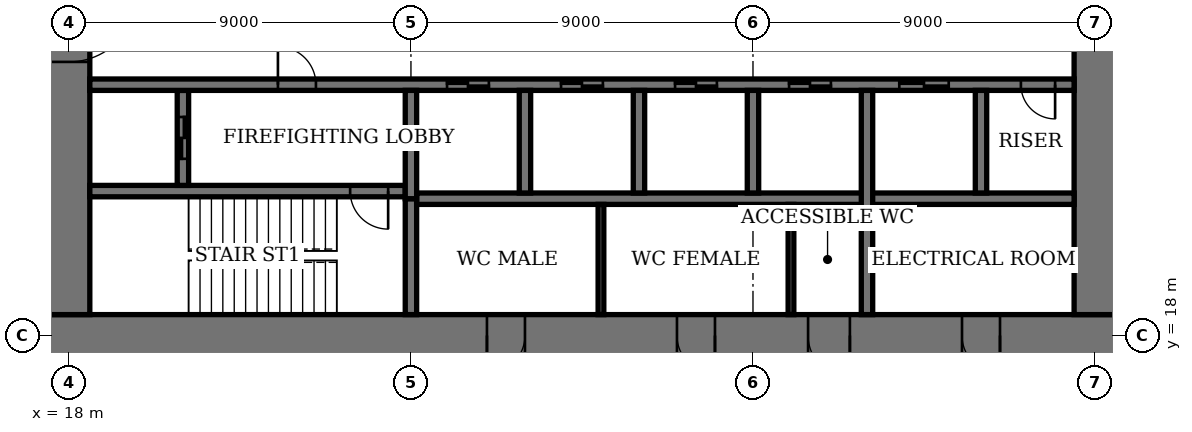
"""IFC4 building model, lengths in metres.
Left out: names, types, materials, properties, quantities, classifications, styles, units other than length and angle.
Written with IfcOpenShell. Run it as: python <this file> out.ifc"""

import sys

from ifc_helpers import new_model, si_unit, direction, frame, frame_2d, origin, place, context, subcontext, project, spatial, rectangle, extrude, element, fill, save


model = new_model("IFC4")
c1 = context("Model", 3, precision=1e-05, world=origin(), true_north=direction((0.0, 1.0)))
c2 = subcontext(c1, "Body", "Model", "MODEL_VIEW")
j1 = project(units=[si_unit("LENGTHUNIT", "METRE"), si_unit("PLANEANGLEUNIT", "RADIAN")], contexts=[c1])
p1 = place(None, origin())
s1 = spatial("IfcSite", under=j1, at=p1, CompositionType="ELEMENT")
p2 = place(p1, origin())
s2 = spatial("IfcBuilding", under=s1, at=p2, CompositionType="ELEMENT")
p3 = place(p2, frame((0.0, 0.0, 279.4)))
s3 = spatial("IfcBuildingStorey", under=s2, at=p3, CompositionType="ELEMENT", Elevation=279.4)
p4 = place(p3, frame((17.45, 18.0, 0.0), z_axis=(0.0, 0.0, 1.0), x_axis=(1.0, 0.0, 0.0)))
e1 = element("IfcWall", 1, at=p4, inside=s3, PredefinedType="SHEAR", context=c2, shape_type="SweptSolid", body=[
    extrude(rectangle(XDim=28.1, YDim=1.1, at=frame_2d((14.05, 0.0))), origin(), (0.0, 0.0, 1.0), 4.0),
])
p5 = place(p4, frame((11.55, 0.0, 0.0)))
e2 = element("IfcOpeningElement", 2, at=p5, cuts=e1, PredefinedType="OPENING", context=c2, shape_type="SweptSolid", body=[
    extrude(rectangle(XDim=1.0, YDim=2.4, at=frame_2d((0.5, 1.2))), frame((0.0, 0.56, 0.0), z_axis=(0.0, -1.0, 0.0), x_axis=(1.0, 0.0, 0.0)), (0.0, 0.0, 1.0), 1.12),
])
p6 = place(p4, frame((16.55, 0.0, 0.0)))
e3 = element("IfcOpeningElement", 3, at=p6, cuts=e1, PredefinedType="OPENING", context=c2, shape_type="SweptSolid", body=[
    extrude(rectangle(XDim=1.0, YDim=2.4, at=frame_2d((0.5, 1.2))), frame((0.0, 0.56, 0.0), z_axis=(0.0, -1.0, 0.0), x_axis=(1.0, 0.0, 0.0)), (0.0, 0.0, 1.0), 1.12),
])
p7 = place(p4, frame((20.0, 0.0, 0.0)))
e4 = element("IfcOpeningElement", 4, at=p7, cuts=e1, PredefinedType="OPENING", context=c2, shape_type="SweptSolid", body=[
    extrude(rectangle(XDim=1.1, YDim=2.4, at=frame_2d((0.55, 1.2))), frame((0.0, 0.56, 0.0), z_axis=(0.0, -1.0, 0.0), x_axis=(1.0, 0.0, 0.0)), (0.0, 0.0, 1.0), 1.12),
])
p8 = place(p4, frame((24.05, 0.0, 0.0)))
e5 = element("IfcOpeningElement", 5, at=p8, cuts=e1, PredefinedType="OPENING", context=c2, shape_type="SweptSolid", body=[
    extrude(rectangle(XDim=1.0, YDim=2.4, at=frame_2d((0.5, 1.2))), frame((0.0, 0.56, 0.0), z_axis=(0.0, -1.0, 0.0), x_axis=(1.0, 0.0, 0.0)), (0.0, 0.0, 1.0), 1.12),
])
p9 = place(p3, frame((18.0, 35.45, 0.0), z_axis=(0.0, 0.0, 1.0), x_axis=(0.0, -1.0, 0.0)))
e6 = element("IfcWall", 6, at=p9, inside=s3, PredefinedType="SHEAR", context=c2, shape_type="SweptSolid", body=[
    extrude(rectangle(XDim=16.9, YDim=1.1, at=frame_2d((8.45, 0.0))), origin(), (0.0, 0.0, 1.0), 4.0),
])
p10 = place(p9, frame((8.45, 0.0, 0.0)))
e7 = element("IfcOpeningElement", 7, at=p10, cuts=e6, PredefinedType="OPENING", context=c2, shape_type="SweptSolid", body=[
    extrude(rectangle(XDim=1.8, YDim=2.4, at=frame_2d((0.9, 1.2))), frame((0.0, 0.56, 0.0), z_axis=(0.0, -1.0, 0.0), x_axis=(1.0, 0.0, 0.0)), (0.0, 0.0, 1.0), 1.12),
])
p11 = place(p3, frame((45.0, 18.55, 0.0), z_axis=(0.0, 0.0, 1.0), x_axis=(0.0, 1.0, 0.0)))
e8 = element("IfcWall", 8, at=p11, inside=s3, PredefinedType="SHEAR", context=c2, shape_type="SweptSolid", body=[
    extrude(rectangle(XDim=16.9, YDim=1.1, at=frame_2d((8.45, 0.0))), origin(), (0.0, 0.0, 1.0), 4.0),
])
p12 = place(p11, frame((8.45, 0.0, 0.0)))
e9 = element("IfcOpeningElement", 9, at=p12, cuts=e8, PredefinedType="OPENING", context=c2, shape_type="SweptSolid", body=[
    extrude(rectangle(XDim=1.8, YDim=2.4, at=frame_2d((0.9, 1.2))), frame((0.0, 0.56, 0.0), z_axis=(0.0, -1.0, 0.0), x_axis=(1.0, 0.0, 0.0)), (0.0, 0.0, 1.0), 1.12),
])
p13 = place(p3, frame((18.55, 21.8, 0.0), z_axis=(0.0, 0.0, 1.0), x_axis=(1.0, 0.0, 0.0)))
e10 = element("IfcWall", 10, at=p13, inside=s3, PredefinedType="SHEAR", context=c2, shape_type="SweptSolid", body=[
    extrude(rectangle(XDim=8.3, YDim=0.3, at=frame_2d((4.15, 0.0))), origin(), (0.0, 0.0, 1.0), 4.0),
])
p14 = place(p13, frame((6.85, 0.0, 0.0)))
e11 = element("IfcOpeningElement", 11, at=p14, cuts=e10, PredefinedType="OPENING", context=c2, shape_type="SweptSolid", body=[
    extrude(rectangle(XDim=1.0, YDim=2.4, at=frame_2d((0.5, 1.2))), frame((0.0, 0.16, 0.0), z_axis=(0.0, -1.0, 0.0), x_axis=(1.0, 0.0, 0.0)), (0.0, 0.0, 1.0), 0.32),
])
p15 = place(p3, frame((27.0, 18.55, 0.0), z_axis=(0.0, 0.0, 1.0), x_axis=(0.0, 1.0, 0.0)))
e12 = element("IfcWall", 12, at=p15, inside=s3, PredefinedType="SHEAR", context=c2, shape_type="SweptSolid", body=[
    extrude(rectangle(XDim=3.05, YDim=0.3, at=frame_2d((1.525, 0.0))), origin(), (0.0, 0.0, 1.0), 4.0),
])
p16 = place(p3, frame((21.0, 21.95, 0.0), z_axis=(0.0, 0.0, 1.0), x_axis=(0.0, 1.0, 0.0)))
e13 = element("IfcWall", 13, at=p16, inside=s3, PredefinedType="SHEAR", context=c2, shape_type="SweptSolid", body=[
    extrude(rectangle(XDim=2.5, YDim=0.3, at=frame_2d((1.25, 0.0))), origin(), (0.0, 0.0, 1.0), 4.0),
])
p17 = place(p16, frame((0.7, 0.0, 0.0)))
e14 = element("IfcOpeningElement", 14, at=p17, cuts=e13, PredefinedType="OPENING", context=c2, shape_type="SweptSolid", body=[
    extrude(rectangle(XDim=1.1, YDim=2.4, at=frame_2d((0.55, 1.2))), frame((0.0, 0.16, 0.0), z_axis=(0.0, -1.0, 0.0), x_axis=(1.0, 0.0, 0.0)), (0.0, 0.0, 1.0), 0.32),
])
p18 = place(p3, frame((18.55, 24.6, 0.0), z_axis=(0.0, 0.0, 1.0), x_axis=(1.0, 0.0, 0.0)))
e15 = element("IfcWall", 15, at=p18, inside=s3, PredefinedType="SHEAR", context=c2, shape_type="SweptSolid", body=[
    extrude(rectangle(XDim=25.9, YDim=0.3, at=frame_2d((12.95, 0.0))), origin(), (0.0, 0.0, 1.0), 4.0),
])
p19 = place(p18, frame((4.95, 0.0, 0.0)))
e16 = element("IfcOpeningElement", 16, at=p19, cuts=e15, PredefinedType="OPENING", context=c2, shape_type="SweptSolid", body=[
    extrude(rectangle(XDim=1.0, YDim=2.4, at=frame_2d((0.5, 1.2))), frame((0.0, 0.16, 0.0), z_axis=(0.0, -1.0, 0.0), x_axis=(1.0, 0.0, 0.0)), (0.0, 0.0, 1.0), 0.32),
])
p20 = place(p18, frame((24.5, 0.0, 0.0)))
e17 = element("IfcOpeningElement", 17, at=p20, cuts=e15, PredefinedType="OPENING", context=c2, shape_type="SweptSolid", body=[
    extrude(rectangle(XDim=0.9, YDim=2.1, at=frame_2d((0.45, 1.05))), frame((0.0, 0.16, 0.0), z_axis=(0.0, -1.0, 0.0), x_axis=(1.0, 0.0, 0.0)), (0.0, 0.0, 1.0), 0.32),
])
p21 = place(p18, frame((9.4, 0.0, 0.0)))
e18 = element("IfcOpeningElement", 18, at=p21, cuts=e15, PredefinedType="OPENING", context=c2, shape_type="SweptSolid", body=[
    extrude(rectangle(XDim=1.1, YDim=2.4, at=frame_2d((0.55, 1.2))), frame((0.0, 0.16, 0.0), z_axis=(0.0, -1.0, 0.0), x_axis=(1.0, 0.0, 0.0)), (0.0, 0.0, 1.0), 0.32),
])
p22 = place(p18, frame((12.4, 0.0, 0.0)))
e19 = element("IfcOpeningElement", 19, at=p22, cuts=e15, PredefinedType="OPENING", context=c2, shape_type="SweptSolid", body=[
    extrude(rectangle(XDim=1.1, YDim=2.4, at=frame_2d((0.55, 1.2))), frame((0.0, 0.16, 0.0), z_axis=(0.0, -1.0, 0.0), x_axis=(1.0, 0.0, 0.0)), (0.0, 0.0, 1.0), 0.32),
])
p23 = place(p18, frame((15.4, 0.0, 0.0)))
e20 = element("IfcOpeningElement", 20, at=p23, cuts=e15, PredefinedType="OPENING", context=c2, shape_type="SweptSolid", body=[
    extrude(rectangle(XDim=1.1, YDim=2.4, at=frame_2d((0.55, 1.2))), frame((0.0, 0.16, 0.0), z_axis=(0.0, -1.0, 0.0), x_axis=(1.0, 0.0, 0.0)), (0.0, 0.0, 1.0), 0.32),
])
p24 = place(p18, frame((18.4, 0.0, 0.0)))
e21 = element("IfcOpeningElement", 21, at=p24, cuts=e15, PredefinedType="OPENING", context=c2, shape_type="SweptSolid", body=[
    extrude(rectangle(XDim=1.1, YDim=2.4, at=frame_2d((0.55, 1.2))), frame((0.0, 0.16, 0.0), z_axis=(0.0, -1.0, 0.0), x_axis=(1.0, 0.0, 0.0)), (0.0, 0.0, 1.0), 0.32),
])
p25 = place(p18, frame((21.3, 0.0, 0.0)))
e22 = element("IfcOpeningElement", 22, at=p25, cuts=e15, PredefinedType="OPENING", context=c2, shape_type="SweptSolid", body=[
    extrude(rectangle(XDim=1.3, YDim=2.4, at=frame_2d((0.65, 1.2))), frame((0.0, 0.16, 0.0), z_axis=(0.0, -1.0, 0.0), x_axis=(1.0, 0.0, 0.0)), (0.0, 0.0, 1.0), 0.32),
])
p26 = place(p3, frame((27.15, 21.6, 0.0), z_axis=(0.0, 0.0, 1.0), x_axis=(1.0, 0.0, 0.0)))
e23 = element("IfcWall", 23, at=p26, inside=s3, PredefinedType="SHEAR", context=c2, shape_type="SweptSolid", body=[
    extrude(rectangle(XDim=17.3, YDim=0.3, at=frame_2d((8.65, 0.0))), origin(), (0.0, 0.0, 1.0), 4.0),
])
for number, where, z_axis, x_axis in (
    (24, (30.0, 21.75, 0.0), (0.0, 0.0, 1.0), (0.0, 1.0, 0.0)),
    (25, (33.0, 21.75, 0.0), (0.0, 0.0, 1.0), (0.0, 1.0, 0.0)),
    (26, (36.0, 21.75, 0.0), (0.0, 0.0, 1.0), (0.0, 1.0, 0.0)),
):
    element("IfcWall", number, at=place(p3, frame(where, z_axis=z_axis, x_axis=x_axis)), inside=s3, PredefinedType="SHEAR", context=c2, shape_type="SweptSolid", body=[
        extrude(rectangle(XDim=2.7, YDim=0.3, at=frame_2d((1.35, 0.0))), origin(), (0.0, 0.0, 1.0), 4.0),
    ])
p27 = place(p3, frame((39.0, 18.55, 0.0), z_axis=(0.0, 0.0, 1.0), x_axis=(0.0, 1.0, 0.0)))
e27 = element("IfcWall", 27, at=p27, inside=s3, PredefinedType="SHEAR", context=c2, shape_type="SweptSolid", body=[
    extrude(rectangle(XDim=5.9, YDim=0.3, at=frame_2d((2.95, 0.0))), origin(), (0.0, 0.0, 1.0), 4.0),
])
p28 = place(p3, frame((42.0, 21.75, 0.0), z_axis=(0.0, 0.0, 1.0), x_axis=(0.0, 1.0, 0.0)))
e28 = element("IfcWall", 28, at=p28, inside=s3, PredefinedType="SHEAR", context=c2, shape_type="SweptSolid", body=[
    extrude(rectangle(XDim=2.7, YDim=0.3, at=frame_2d((1.35, 0.0))), origin(), (0.0, 0.0, 1.0), 4.0),
])
p29 = place(p3, frame((27.0, 21.6, 0.0), z_axis=(0.0, 0.0, 1.0), x_axis=(0.0, 1.0, 0.0)))
e29 = element("IfcWall", 29, at=p29, inside=s3, PredefinedType="SHEAR", context=c2, shape_type="SweptSolid", body=[
    extrude(rectangle(XDim=2.85, YDim=0.3, at=frame_2d((1.425, 0.0))), origin(), (0.0, 0.0, 1.0), 4.0),
])
for number, where, z_axis, x_axis in (
    (30, (32.0, 18.55, 0.0), (0.0, 0.0, 1.0), (0.0, 1.0, 0.0)),
    (31, (37.0, 18.55, 0.0), (0.0, 0.0, 1.0), (0.0, 1.0, 0.0)),
):
    element("IfcWall", number, at=place(p3, frame(where, z_axis=z_axis, x_axis=x_axis)), inside=s3, PredefinedType="PARTITIONING", context=c2, shape_type="SweptSolid", body=[
        extrude(rectangle(XDim=2.9, YDim=0.15, at=frame_2d((1.45, 0.0))), origin(), (0.0, 0.0, 1.0), 3.75),
    ])
p30 = place(p10, origin())
e32 = element("IfcDoor", 32, at=p30, inside=s3, OperationType="DOUBLE_DOOR_DOUBLE_SWING", PredefinedType="DOOR", context=c2, shape_type="SweptSolid", body=[
    extrude(rectangle(XDim=1.8, YDim=2.4, at=frame_2d((0.9, 1.2))), frame((0.0, 0.03, 0.0), z_axis=(0.0, -1.0, 0.0), x_axis=(1.0, 0.0, 0.0)), (0.0, 0.0, 1.0), 0.06),
    extrude(rectangle(XDim=0.04, YDim=2.4, at=frame_2d((0.02, 1.2))), frame((0.0, 0.55, 0.0), z_axis=(0.0, -1.0, 0.0), x_axis=(1.0, 0.0, 0.0)), (0.0, 0.0, 1.0), 1.1),
    extrude(rectangle(XDim=0.04, YDim=2.4, at=frame_2d((1.78, 1.2))), frame((0.0, 0.55, 0.0), z_axis=(0.0, -1.0, 0.0), x_axis=(1.0, 0.0, 0.0)), (0.0, 0.0, 1.0), 1.1),
    extrude(rectangle(XDim=1.8, YDim=0.04, at=frame_2d((0.9, 2.38))), frame((0.0, 0.55, 0.0), z_axis=(0.0, -1.0, 0.0), x_axis=(1.0, 0.0, 0.0)), (0.0, 0.0, 1.0), 1.1),
])
fill(e7, e32)
p31 = place(p5, origin())
e33 = element("IfcDoor", 33, at=p31, inside=s3, OperationType="SINGLE_SWING_LEFT", PredefinedType="DOOR", context=c2, shape_type="SweptSolid", body=[
    extrude(rectangle(XDim=1.0, YDim=2.4, at=frame_2d((0.5, 1.2))), frame((0.0, 0.025, 0.0), z_axis=(0.0, -1.0, 0.0), x_axis=(1.0, 0.0, 0.0)), (0.0, 0.0, 1.0), 0.05),
    extrude(rectangle(XDim=0.04, YDim=2.4, at=frame_2d((0.02, 1.2))), frame((0.0, 0.4, 0.0), z_axis=(0.0, -1.0, 0.0), x_axis=(1.0, 0.0, 0.0)), (0.0, 0.0, 1.0), 0.8),
    extrude(rectangle(XDim=0.04, YDim=2.4, at=frame_2d((0.98, 1.2))), frame((0.0, 0.4, 0.0), z_axis=(0.0, -1.0, 0.0), x_axis=(1.0, 0.0, 0.0)), (0.0, 0.0, 1.0), 0.8),
    extrude(rectangle(XDim=1.0, YDim=0.04, at=frame_2d((0.5, 2.38))), frame((0.0, 0.4, 0.0), z_axis=(0.0, -1.0, 0.0), x_axis=(1.0, 0.0, 0.0)), (0.0, 0.0, 1.0), 0.8),
])
fill(e2, e33)
p32 = place(p6, origin())
e34 = element("IfcDoor", 34, at=p32, inside=s3, OperationType="SINGLE_SWING_RIGHT", PredefinedType="DOOR", context=c2, shape_type="SweptSolid", body=[
    extrude(rectangle(XDim=1.0, YDim=2.4, at=frame_2d((0.5, 1.2))), frame((0.0, 0.025, 0.0), z_axis=(0.0, -1.0, 0.0), x_axis=(1.0, 0.0, 0.0)), (0.0, 0.0, 1.0), 0.05),
    extrude(rectangle(XDim=0.04, YDim=2.4, at=frame_2d((0.02, 1.2))), frame((0.0, 0.4, 0.0), z_axis=(0.0, -1.0, 0.0), x_axis=(1.0, 0.0, 0.0)), (0.0, 0.0, 1.0), 0.8),
    extrude(rectangle(XDim=0.04, YDim=2.4, at=frame_2d((0.98, 1.2))), frame((0.0, 0.4, 0.0), z_axis=(0.0, -1.0, 0.0), x_axis=(1.0, 0.0, 0.0)), (0.0, 0.0, 1.0), 0.8),
    extrude(rectangle(XDim=1.0, YDim=0.04, at=frame_2d((0.5, 2.38))), frame((0.0, 0.4, 0.0), z_axis=(0.0, -1.0, 0.0), x_axis=(1.0, 0.0, 0.0)), (0.0, 0.0, 1.0), 0.8),
])
fill(e3, e34)
p33 = place(p7, origin())
e35 = element("IfcDoor", 35, at=p33, inside=s3, OperationType="SINGLE_SWING_RIGHT", PredefinedType="DOOR", context=c2, shape_type="SweptSolid", body=[
    extrude(rectangle(XDim=1.1, YDim=2.4, at=frame_2d((0.55, 1.2))), frame((0.0, 0.025, 0.0), z_axis=(0.0, -1.0, 0.0), x_axis=(1.0, 0.0, 0.0)), (0.0, 0.0, 1.0), 0.05),
    extrude(rectangle(XDim=0.04, YDim=2.4, at=frame_2d((0.02, 1.2))), frame((0.0, 0.44, 0.0), z_axis=(0.0, -1.0, 0.0), x_axis=(1.0, 0.0, 0.0)), (0.0, 0.0, 1.0), 0.88),
    extrude(rectangle(XDim=0.04, YDim=2.4, at=frame_2d((1.08, 1.2))), frame((0.0, 0.44, 0.0), z_axis=(0.0, -1.0, 0.0), x_axis=(1.0, 0.0, 0.0)), (0.0, 0.0, 1.0), 0.88),
    extrude(rectangle(XDim=1.1, YDim=0.04, at=frame_2d((0.55, 2.38))), frame((0.0, 0.44, 0.0), z_axis=(0.0, -1.0, 0.0), x_axis=(1.0, 0.0, 0.0)), (0.0, 0.0, 1.0), 0.88),
])
fill(e4, e35)
p34 = place(p8, origin())
e36 = element("IfcDoor", 36, at=p34, inside=s3, OperationType="SINGLE_SWING_RIGHT", PredefinedType="DOOR", context=c2, shape_type="SweptSolid", body=[
    extrude(rectangle(XDim=1.0, YDim=2.4, at=frame_2d((0.5, 1.2))), frame((0.0, 0.025, 0.0), z_axis=(0.0, -1.0, 0.0), x_axis=(1.0, 0.0, 0.0)), (0.0, 0.0, 1.0), 0.05),
    extrude(rectangle(XDim=0.04, YDim=2.4, at=frame_2d((0.02, 1.2))), frame((0.0, 0.4, 0.0), z_axis=(0.0, -1.0, 0.0), x_axis=(1.0, 0.0, 0.0)), (0.0, 0.0, 1.0), 0.8),
    extrude(rectangle(XDim=0.04, YDim=2.4, at=frame_2d((0.98, 1.2))), frame((0.0, 0.4, 0.0), z_axis=(0.0, -1.0, 0.0), x_axis=(1.0, 0.0, 0.0)), (0.0, 0.0, 1.0), 0.8),
    extrude(rectangle(XDim=1.0, YDim=0.04, at=frame_2d((0.5, 2.38))), frame((0.0, 0.4, 0.0), z_axis=(0.0, -1.0, 0.0), x_axis=(1.0, 0.0, 0.0)), (0.0, 0.0, 1.0), 0.8),
])
fill(e5, e36)
p35 = place(p14, origin())
e37 = element("IfcDoor", 37, at=p35, inside=s3, OperationType="SINGLE_SWING_RIGHT", PredefinedType="DOOR", context=c2, shape_type="SweptSolid", body=[
    extrude(rectangle(XDim=1.0, YDim=2.4, at=frame_2d((0.5, 1.2))), frame((0.0, 0.03, 0.0), z_axis=(0.0, -1.0, 0.0), x_axis=(1.0, 0.0, 0.0)), (0.0, 0.0, 1.0), 0.06),
])
fill(e11, e37)
p36 = place(p19, origin())
e38 = element("IfcDoor", 38, at=p36, inside=s3, OperationType="SINGLE_SWING_RIGHT", PredefinedType="DOOR", context=c2, shape_type="SweptSolid", body=[
    extrude(rectangle(XDim=1.0, YDim=2.4, at=frame_2d((0.5, 1.2))), frame((0.0, 0.03, 0.0), z_axis=(0.0, -1.0, 0.0), x_axis=(1.0, 0.0, 0.0)), (0.0, 0.0, 1.0), 0.06),
])
fill(e16, e38)
p37 = place(p20, origin())
e39 = element("IfcDoor", 39, at=p37, inside=s3, OperationType="SINGLE_SWING_RIGHT", PredefinedType="DOOR", context=c2, shape_type="SweptSolid", body=[
    extrude(rectangle(XDim=0.9, YDim=2.1, at=frame_2d((0.45, 1.05))), frame((0.0, 0.03, 0.0), z_axis=(0.0, -1.0, 0.0), x_axis=(1.0, 0.0, 0.0)), (0.0, 0.0, 1.0), 0.06),
])
fill(e17, e39)
p38 = place(p21, origin())
e40 = element("IfcDoor", 40, at=p38, inside=s3, OperationType="DOUBLE_DOOR_SLIDING", PredefinedType="DOOR", context=c2, shape_type="SweptSolid", body=[
    extrude(rectangle(XDim=1.1, YDim=2.4, at=frame_2d((0.55, 1.2))), frame((0.0, 0.02, 0.0), z_axis=(0.0, -1.0, 0.0), x_axis=(1.0, 0.0, 0.0)), (0.0, 0.0, 1.0), 0.04),
])
fill(e18, e40)
p39 = place(p22, origin())
e41 = element("IfcDoor", 41, at=p39, inside=s3, OperationType="DOUBLE_DOOR_SLIDING", PredefinedType="DOOR", context=c2, shape_type="SweptSolid", body=[
    extrude(rectangle(XDim=1.1, YDim=2.4, at=frame_2d((0.55, 1.2))), frame((0.0, 0.02, 0.0), z_axis=(0.0, -1.0, 0.0), x_axis=(1.0, 0.0, 0.0)), (0.0, 0.0, 1.0), 0.04),
])
fill(e19, e41)
p40 = place(p23, origin())
e42 = element("IfcDoor", 42, at=p40, inside=s3, OperationType="DOUBLE_DOOR_SLIDING", PredefinedType="DOOR", context=c2, shape_type="SweptSolid", body=[
    extrude(rectangle(XDim=1.1, YDim=2.4, at=frame_2d((0.55, 1.2))), frame((0.0, 0.02, 0.0), z_axis=(0.0, -1.0, 0.0), x_axis=(1.0, 0.0, 0.0)), (0.0, 0.0, 1.0), 0.04),
])
fill(e20, e42)
p41 = place(p24, origin())
e43 = element("IfcDoor", 43, at=p41, inside=s3, OperationType="DOUBLE_DOOR_SLIDING", PredefinedType="DOOR", context=c2, shape_type="SweptSolid", body=[
    extrude(rectangle(XDim=1.1, YDim=2.4, at=frame_2d((0.55, 1.2))), frame((0.0, 0.02, 0.0), z_axis=(0.0, -1.0, 0.0), x_axis=(1.0, 0.0, 0.0)), (0.0, 0.0, 1.0), 0.04),
])
fill(e21, e43)
p42 = place(p25, origin())
e44 = element("IfcDoor", 44, at=p42, inside=s3, OperationType="DOUBLE_DOOR_SLIDING", PredefinedType="DOOR", context=c2, shape_type="SweptSolid", body=[
    extrude(rectangle(XDim=1.3, YDim=2.4, at=frame_2d((0.65, 1.2))), frame((0.0, 0.02, 0.0), z_axis=(0.0, -1.0, 0.0), x_axis=(1.0, 0.0, 0.0)), (0.0, 0.0, 1.0), 0.04),
])
fill(e22, e44)
p43 = place(p17, origin())
e45 = element("IfcDoor", 45, at=p43, inside=s3, OperationType="DOUBLE_DOOR_SLIDING", PredefinedType="DOOR", context=c2, shape_type="SweptSolid", body=[
    extrude(rectangle(XDim=1.1, YDim=2.4, at=frame_2d((0.55, 1.2))), frame((0.0, 0.03, 0.0), z_axis=(0.0, -1.0, 0.0), x_axis=(1.0, 0.0, 0.0)), (0.0, 0.0, 1.0), 0.06),
])
fill(e14, e45)
save(model, sys.argv[1])
